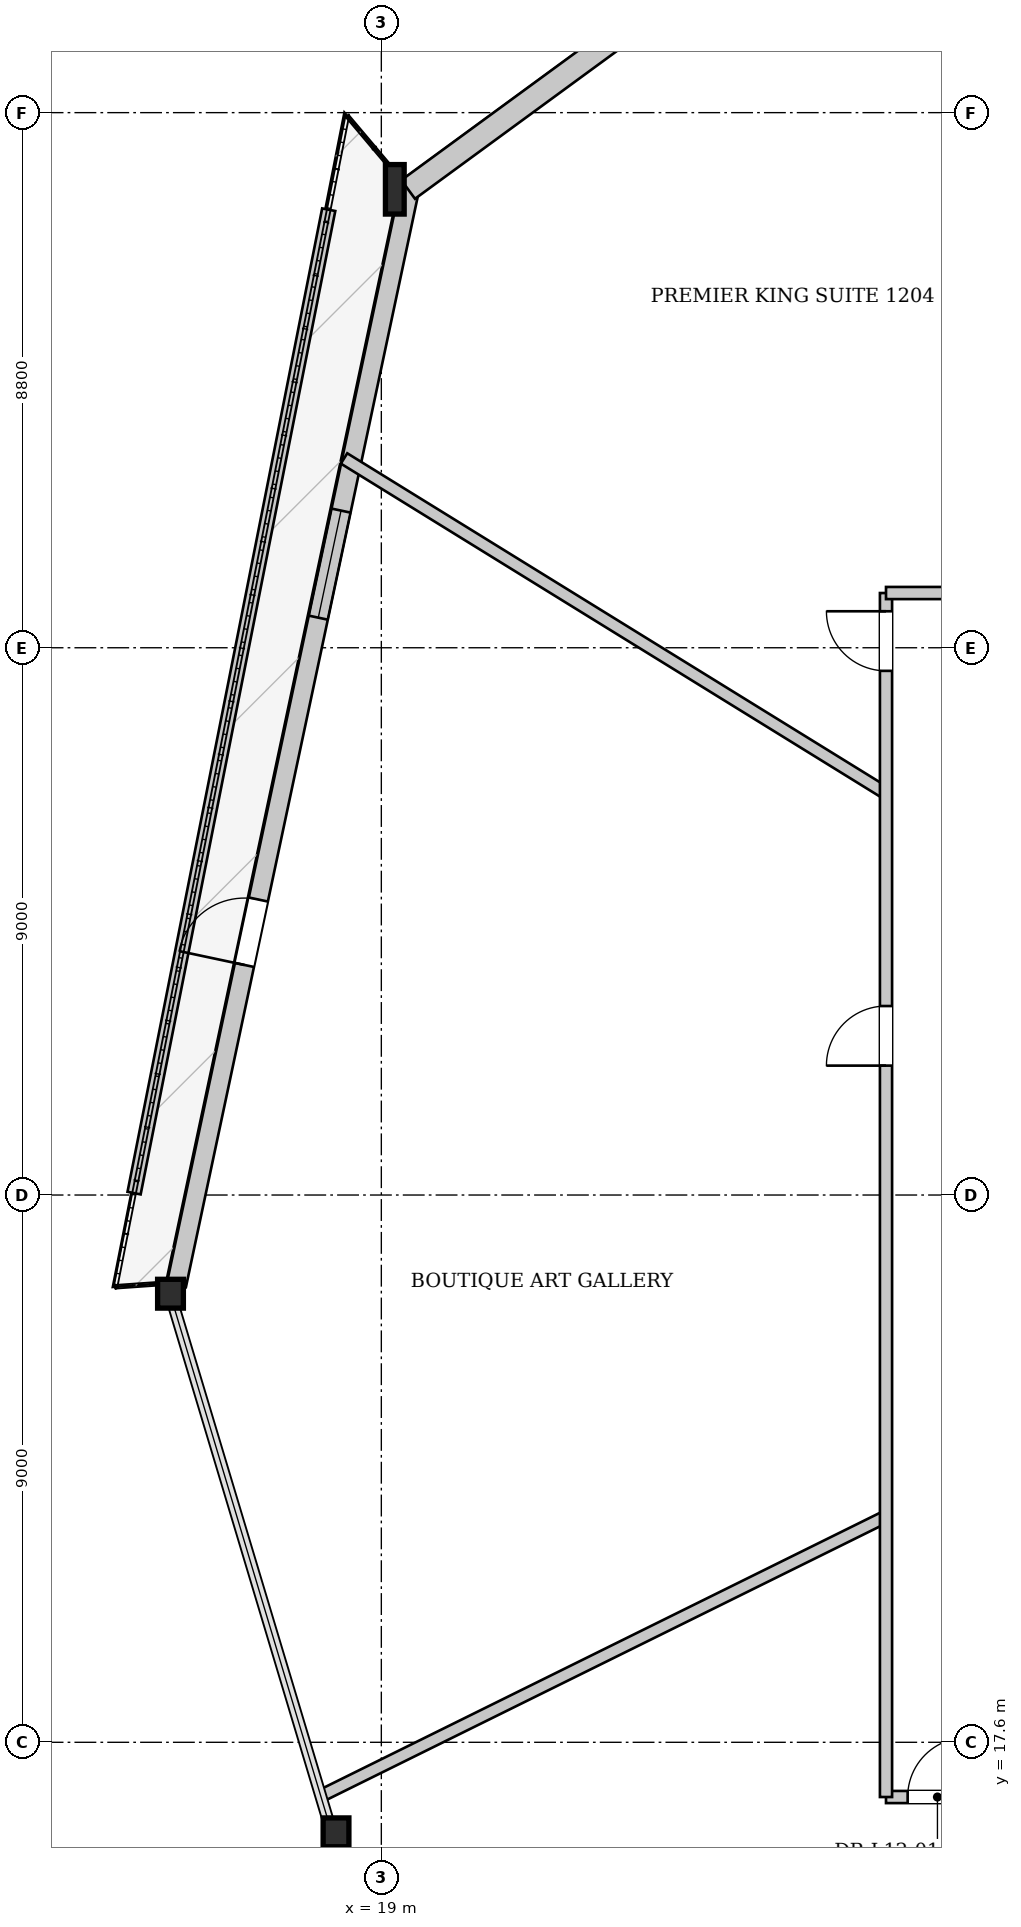
"""IFC4 building model, lengths in metres.
Left out: names, types, materials, properties, quantities, classifications, styles, units other than length and angle.
Written with IfcOpenShell. Run it as: python <this file> out.ifc"""

import sys

from ifc_helpers import new_model, si_unit, direction, frame, frame_2d, origin, origin_2d, place, context, subcontext, project, spatial, rectangle, i_section, extrude, source, transform, mapped, element, fill, save


model = new_model("IFC4")
c1 = context("Model", 3, precision=1e-05, world=origin(), true_north=direction((0.0, 1.0)))
c2 = subcontext(c1, "Body", "Model", "MODEL_VIEW")
j1 = project(units=[si_unit("LENGTHUNIT", "METRE"), si_unit("PLANEANGLEUNIT", "RADIAN")], contexts=[c1])
p1 = place(None, origin())
s1 = spatial("IfcSite", under=j1, at=p1, CompositionType="ELEMENT")
p2 = place(p1, origin())
s2 = spatial("IfcBuilding", under=s1, at=p2, CompositionType="ELEMENT")
p3 = place(p2, frame((0.0, 0.0, 50.6)))
s3 = spatial("IfcBuildingStorey", under=s2, at=p3, CompositionType="ELEMENT", Elevation=50.6)
m1 = source(origin(), c2, "Body", "SweptSolid", [
    extrude(i_section(OverallWidth=0.308, OverallDepth=0.814, WebThickness=0.021, FlangeThickness=0.04, at=origin_2d()), origin(), (0.0, 0.0, 1.0), 3.405),
])
p4 = place(p3, frame((19.329, 43.29, 0.0), z_axis=(-0.063307147293, -0.088543971582, 0.994058433996), x_axis=(0.81346635403, -0.581611976201, 0.0)))
e1 = element("IfcColumn", 1, at=p4, inside=s3, PredefinedType="COLUMN", context=c2, shape_type="MappedRepresentation", body=[
    mapped(m1, transform((0.0, 0.0, 0.0), x_axis=(1.0, 0.0, 0.0), y_axis=(0.0, 1.0, 0.0), z_axis=(0.0, 0.0, 1.0), scale=1.0)),
])
m2 = source(origin(), c2, "Body", "SweptSolid", [
    extrude(i_section(OverallWidth=0.424, OverallDepth=0.474, WebThickness=0.043, FlangeThickness=0.068, at=origin_2d()), origin(), (0.0, 0.0, 1.0), 3.405),
])
p5 = place(p3, frame((15.473, 25.151, 0.0), z_axis=(0.035134922072, -0.101891274009, 0.994174886794), x_axis=(0.945372981626, 0.325990683319, 0.0)))
e2 = element("IfcColumn", 2, at=p5, inside=s3, PredefinedType="COLUMN", context=c2, shape_type="MappedRepresentation", body=[
    mapped(m2, transform((0.0, 0.0, 0.0), x_axis=(1.0, 0.0, 0.0), y_axis=(0.0, 1.0, 0.0), z_axis=(0.0, 0.0, 1.0), scale=1.0)),
])
m3 = source(origin(), c2, "Body", "SweptSolid", [
    extrude(i_section(OverallWidth=0.424, OverallDepth=0.474, WebThickness=0.043, FlangeThickness=0.068, at=origin_2d()), origin(), (0.0, 0.0, 1.0), 3.406),
])
p6 = place(p3, frame((18.138, 16.27, 0.0), z_axis=(0.068448115891, -0.08815830633, 0.993751965259), x_axis=(0.789870612442, 0.613273524294, 0.0)))
e3 = element("IfcColumn", 3, at=p6, inside=s3, PredefinedType="COLUMN", context=c2, shape_type="MappedRepresentation", body=[
    mapped(m3, transform((0.0, 0.0, 0.0), x_axis=(1.0, 0.0, 0.0), y_axis=(0.0, 1.0, 0.0), z_axis=(0.0, 0.0, 1.0), scale=1.0)),
])
p7 = place(p3, frame((15.629, 25.117, 0.0), z_axis=(0.0, 0.0, 1.0), x_axis=(0.207965348846, 0.97813619383, 0.0)))
e4 = element("IfcWall", 4, at=p7, inside=s3, PredefinedType="SOLIDWALL", context=c2, shape_type="SweptSolid", body=[
    extrude(rectangle(XDim=18.545, YDim=0.32, at=frame_2d((9.272, 0.0))), origin(), (0.0, 0.0, 1.0), 2.592),
])
p8 = place(p7, frame((5.384, 0.0, 0.0)))
e5 = element("IfcOpeningElement", 5, at=p8, cuts=e4, PredefinedType="OPENING", context=c2, shape_type="SweptSolid", body=[
    extrude(rectangle(XDim=1.1, YDim=2.3, at=frame_2d((0.55, 1.15))), frame((0.0, 0.17, 0.0), z_axis=(0.0, -1.0, 0.0), x_axis=(1.0, 0.0, 0.0)), (0.0, 0.0, 1.0), 0.34),
])
p9 = place(p7, frame((11.223, 0.0, 0.272)))
e6 = element("IfcOpeningElement", 6, at=p9, cuts=e4, PredefinedType="OPENING", context=c2, shape_type="SweptSolid", body=[
    extrude(rectangle(XDim=1.8, YDim=2.2, at=frame_2d((0.9, 1.1))), frame((0.0, 0.17, 0.0), z_axis=(0.0, -1.0, 0.0), x_axis=(1.0, 0.0, 0.0)), (0.0, 0.0, 1.0), 0.34),
])
p10 = place(p3, frame((19.441, 43.136, 0.0), z_axis=(0.0, 0.0, 1.0), x_axis=(0.806936258976, 0.590638530702, 0.0)))
e7 = element("IfcWall", 7, at=p10, inside=s3, PredefinedType="SOLIDWALL", context=c2, shape_type="SweptSolid", body=[
    extrude(rectangle(XDim=6.366, YDim=0.38, at=frame_2d((3.183, 0.0))), origin(), (0.0, 0.0, 1.0), 2.592),
])
p11 = place(p3, frame((18.135, 42.804, 0.0), z_axis=(0.0, 0.0, 1.0), x_axis=(-0.194176334872, -0.980966641113, 0.0)))
e8 = element("IfcWall", 8, at=p11, inside=s3, PredefinedType="PARAPET", context=c2, shape_type="SweptSolid", body=[
    extrude(rectangle(XDim=16.486, YDim=0.22, at=frame_2d((8.243, 0.0))), origin(), (0.0, 0.0, 1.0), 0.3),
])
p12 = place(p3, frame((27.3, 33.208, 0.0), z_axis=(0.0, 0.0, 1.0), x_axis=(-0.850809029341, 0.525475018998, 0.0)))
e9 = element("IfcWall", 9, at=p12, inside=s3, PredefinedType="PARTITIONING", context=c2, shape_type="SweptSolid", body=[
    extrude(rectangle(XDim=10.476, YDim=0.2, at=frame_2d((5.238, 0.0))), origin(), (0.0, 0.0, 1.0), 3.3),
])
p13 = place(p3, frame((27.3, 21.312, 0.0), z_axis=(0.0, 0.0, 1.0), x_axis=(-0.896486110775, -0.443071837502, 0.0)))
e10 = element("IfcWall", 10, at=p13, inside=s3, PredefinedType="PARTITIONING", context=c2, shape_type="SweptSolid", body=[
    extrude(rectangle(XDim=10.339, YDim=0.2, at=frame_2d((5.17, 0.0))), origin(), (0.0, 0.0, 1.0), 3.3),
])
p14 = place(p3, frame((27.3, 16.7, 0.0), z_axis=(0.0, 0.0, 1.0), x_axis=(1.0, 0.0, 0.0)))
e11 = element("IfcWall", 11, at=p14, inside=s3, PredefinedType="PARTITIONING", context=c2, shape_type="SweptSolid", body=[
    extrude(rectangle(XDim=21.4, YDim=0.2, at=frame_2d((10.7, 0.0))), origin(), (0.0, 0.0, 1.0), 3.3),
])
p15 = place(p14, frame((20.12, 0.0, 0.0)))
e12 = element("IfcOpeningElement", 12, at=p15, cuts=e11, PredefinedType="OPENING", context=c2, shape_type="SweptSolid", body=[
    extrude(rectangle(XDim=0.98, YDim=2.15, at=frame_2d((0.49, 1.075))), frame((0.0, 0.11, 0.0), z_axis=(0.0, -1.0, 0.0), x_axis=(1.0, 0.0, 0.0)), (0.0, 0.0, 1.0), 0.22),
])
p16 = place(p14, frame((0.356, 0.0, 0.0)))
e13 = element("IfcOpeningElement", 13, at=p16, cuts=e11, PredefinedType="OPENING", context=c2, shape_type="SweptSolid", body=[
    extrude(rectangle(XDim=0.98, YDim=2.15, at=frame_2d((0.49, 1.075))), frame((0.0, 0.11, 0.0), z_axis=(0.0, -1.0, 0.0), x_axis=(1.0, 0.0, 0.0)), (0.0, 0.0, 1.0), 0.22),
])
p17 = place(p14, frame((14.236, 0.0, 0.0)))
e14 = element("IfcOpeningElement", 14, at=p17, cuts=e11, PredefinedType="OPENING", context=c2, shape_type="SweptSolid", body=[
    extrude(rectangle(XDim=0.98, YDim=2.15, at=frame_2d((0.49, 1.075))), frame((0.0, 0.11, 0.0), z_axis=(0.0, -1.0, 0.0), x_axis=(1.0, 0.0, 0.0)), (0.0, 0.0, 1.0), 0.22),
])
p18 = place(p3, frame((27.3, 16.7, 0.0), z_axis=(0.0, 0.0, 1.0), x_axis=(0.0, 1.0, 0.0)))
e15 = element("IfcWall", 15, at=p18, inside=s3, PredefinedType="PARTITIONING", context=c2, shape_type="SweptSolid", body=[
    extrude(rectangle(XDim=19.8, YDim=0.2, at=frame_2d((9.9, 0.0))), origin(), (0.0, 0.0, 1.0), 3.3),
])
p19 = place(p18, frame((18.52, 0.0, 0.0)))
e16 = element("IfcOpeningElement", 16, at=p19, cuts=e15, PredefinedType="OPENING", context=c2, shape_type="SweptSolid", body=[
    extrude(rectangle(XDim=0.98, YDim=2.15, at=frame_2d((0.49, 1.075))), frame((0.0, 0.11, 0.0), z_axis=(0.0, -1.0, 0.0), x_axis=(1.0, 0.0, 0.0)), (0.0, 0.0, 1.0), 0.22),
])
p20 = place(p18, frame((12.028, 0.0, 0.0)))
e17 = element("IfcOpeningElement", 17, at=p20, cuts=e15, PredefinedType="OPENING", context=c2, shape_type="SweptSolid", body=[
    extrude(rectangle(XDim=0.98, YDim=2.15, at=frame_2d((0.49, 1.075))), frame((0.0, 0.11, 0.0), z_axis=(0.0, -1.0, 0.0), x_axis=(1.0, 0.0, 0.0)), (0.0, 0.0, 1.0), 0.22),
])
p21 = place(p3, frame((27.3, 36.5, 0.0), z_axis=(0.0, 0.0, 1.0), x_axis=(1.0, 0.0, 0.0)))
e18 = element("IfcWall", 18, at=p21, inside=s3, PredefinedType="PARTITIONING", context=c2, shape_type="SweptSolid", body=[
    extrude(rectangle(XDim=21.4, YDim=0.2, at=frame_2d((10.7, 0.0))), origin(), (0.0, 0.0, 1.0), 3.3),
])
p22 = place(p21, frame((16.992, 0.0, 0.0)))
e19 = element("IfcOpeningElement", 19, at=p22, cuts=e18, PredefinedType="OPENING", context=c2, shape_type="SweptSolid", body=[
    extrude(rectangle(XDim=0.98, YDim=2.15, at=frame_2d((0.49, 1.075))), frame((0.0, 0.11, 0.0), z_axis=(0.0, -1.0, 0.0), x_axis=(1.0, 0.0, 0.0)), (0.0, 0.0, 1.0), 0.22),
])
m4 = source(origin(), c2, "Body", "SweptSolid", [
    extrude(rectangle(XDim=1.1, YDim=2.3, at=frame_2d((0.55, 1.15))), frame((0.0, 0.025, 0.0), z_axis=(0.0, -1.0, 0.0), x_axis=(1.0, 0.0, 0.0)), (0.0, 0.0, 1.0), 0.05),
])
p23 = place(p8, origin())
e20 = element("IfcDoor", 20, at=p23, inside=s3, OperationType="SINGLE_SWING_LEFT", PredefinedType="DOOR", context=c2, shape_type="MappedRepresentation", body=[
    mapped(m4, transform((0.0, 0.0, 0.0), x_axis=(1.0, 0.0, 0.0), y_axis=(0.0, 1.0, 0.0), z_axis=(0.0, 0.0, 1.0), scale=1.0)),
])
fill(e5, e20)
m5 = source(origin(), c2, "Body", "SweptSolid", [
    extrude(rectangle(XDim=1.8, YDim=2.2, at=frame_2d((0.9, 1.1))), frame((0.0, 0.03, 0.0), z_axis=(0.0, -1.0, 0.0), x_axis=(1.0, 0.0, 0.0)), (0.0, 0.0, 1.0), 0.06),
])
p24 = place(p9, origin())
e21 = element("IfcWindow", 21, at=p24, inside=s3, PartitioningType="SINGLE_PANEL", PredefinedType="WINDOW", context=c2, shape_type="MappedRepresentation", body=[
    mapped(m5, transform((0.0, 0.0, 0.0), x_axis=(1.0, 0.0, 0.0), y_axis=(0.0, 1.0, 0.0), z_axis=(0.0, 0.0, 1.0), scale=1.0)),
])
fill(e6, e21)
m6 = source(origin(), c2, "Body", "SweptSolid", [
    extrude(rectangle(XDim=0.98, YDim=2.15, at=frame_2d((0.49, 1.075))), frame((0.0, 0.025, 0.0), z_axis=(0.0, -1.0, 0.0), x_axis=(1.0, 0.0, 0.0)), (0.0, 0.0, 1.0), 0.05),
])
p25 = place(p16, origin())
e22 = element("IfcDoor", 22, at=p25, inside=s3, OperationType="SINGLE_SWING_RIGHT", PredefinedType="DOOR", context=c2, shape_type="MappedRepresentation", body=[
    mapped(m6, transform((0.0, 0.0, 0.0), x_axis=(1.0, 0.0, 0.0), y_axis=(0.0, 1.0, 0.0), z_axis=(0.0, 0.0, 1.0), scale=1.0)),
])
fill(e13, e22)
p26 = place(p19, origin())
e23 = element("IfcDoor", 23, at=p26, inside=s3, OperationType="SINGLE_SWING_RIGHT", PredefinedType="DOOR", context=c2, shape_type="MappedRepresentation", body=[
    mapped(m6, transform((0.0, 0.0, 0.0), x_axis=(1.0, 0.0, 0.0), y_axis=(0.0, 1.0, 0.0), z_axis=(0.0, 0.0, 1.0), scale=1.0)),
])
fill(e16, e23)
p27 = place(p20, origin())
e24 = element("IfcDoor", 24, at=p27, inside=s3, OperationType="SINGLE_SWING_LEFT", PredefinedType="DOOR", context=c2, shape_type="MappedRepresentation", body=[
    mapped(m6, transform((0.0, 0.0, 0.0), x_axis=(1.0, 0.0, 0.0), y_axis=(0.0, 1.0, 0.0), z_axis=(0.0, 0.0, 1.0), scale=1.0)),
])
fill(e17, e24)
save(model, sys.argv[1])
